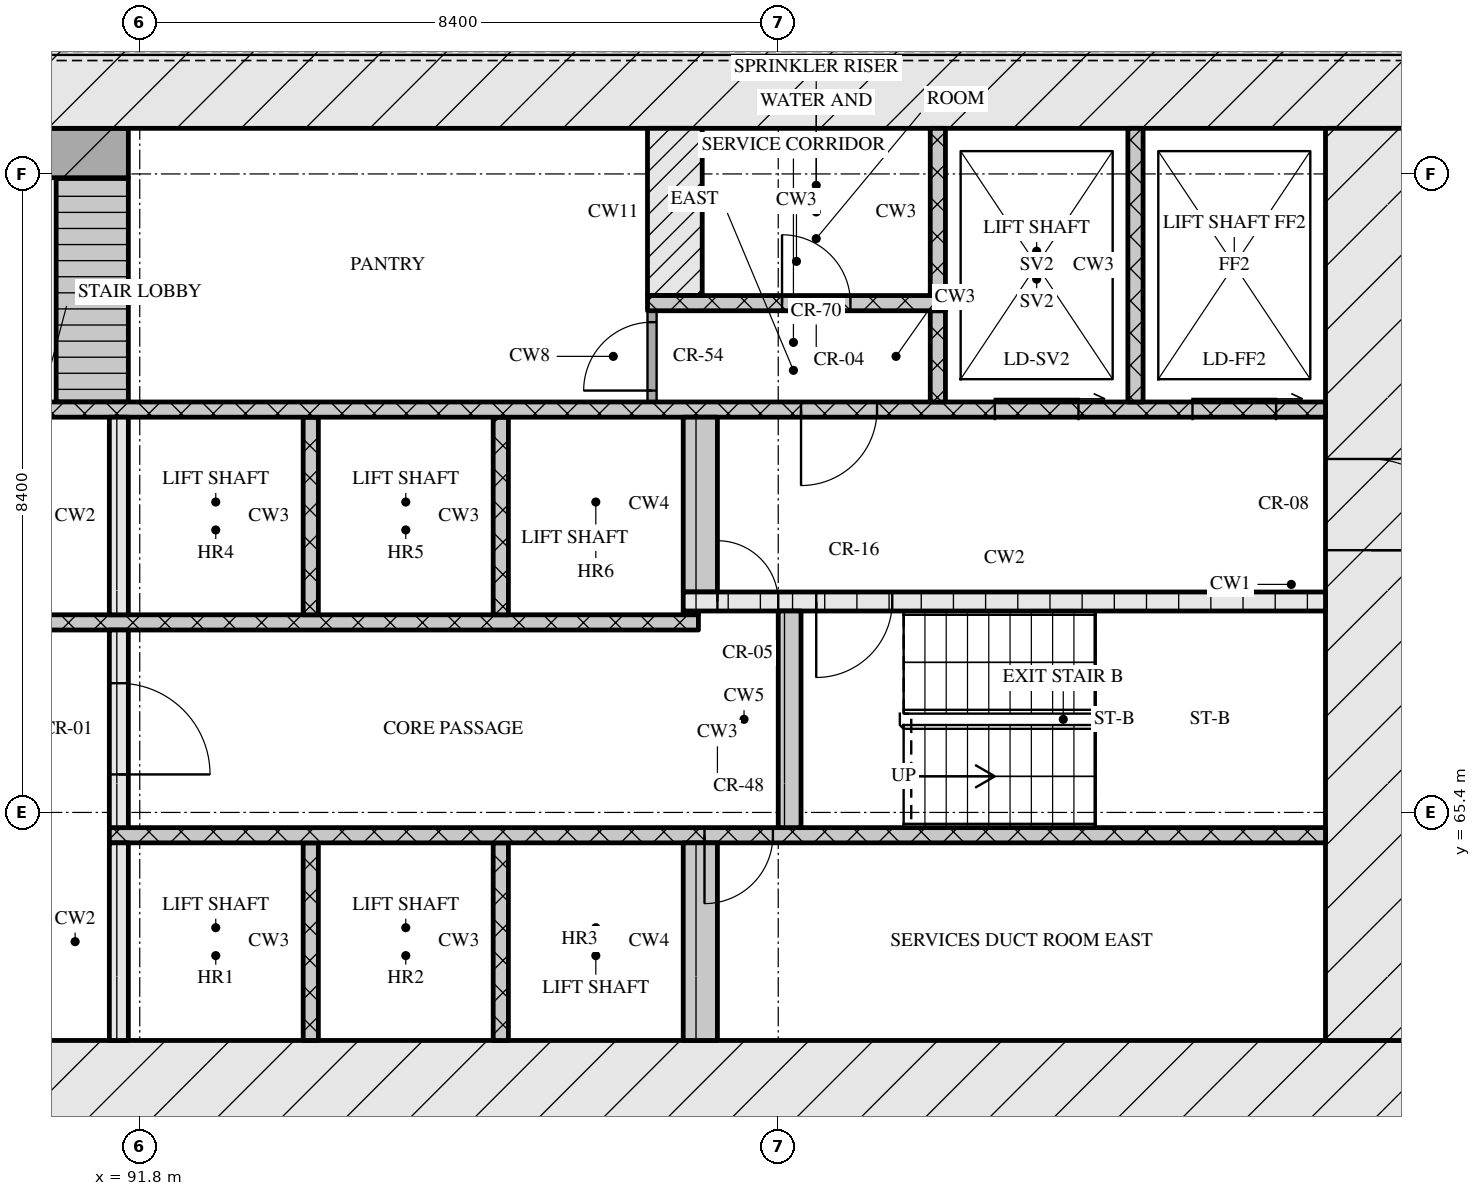
"""IFC4 building model, lengths in metres.
Left out: names, types, materials, properties, quantities, classifications, styles, units other than length and angle.
Written with IfcOpenShell. Run it as: python <this file> out.ifc"""

import sys

from ifc_helpers import new_model, si_unit, direction, frame, frame_2d, origin, place, context, subcontext, project, spatial, rectangle, extrude, element, fill, save


model = new_model("IFC4")
c1 = context("Model", 3, precision=1e-05, world=origin(), true_north=direction((0.0, 1.0)))
c2 = subcontext(c1, "Body", "Model", "MODEL_VIEW")
j1 = project(units=[si_unit("LENGTHUNIT", "METRE"), si_unit("PLANEANGLEUNIT", "RADIAN")], contexts=[c1])
p1 = place(None, origin())
s1 = spatial("IfcSite", under=j1, at=p1, CompositionType="ELEMENT")
p2 = place(p1, origin())
s2 = spatial("IfcBuilding", under=s1, at=p2, CompositionType="ELEMENT")
p3 = place(p2, frame((0.0, 0.0, 76.8)))
s3 = spatial("IfcBuildingStorey", under=s2, at=p3, CompositionType="ELEMENT", Elevation=76.8)
p4 = place(p3, frame((66.6, 61.8, 0.0), z_axis=(0.0, 0.0, 1.0), x_axis=(1.0, 0.0, 0.0)))
e1 = element("IfcWall", 1, at=p4, inside=s3, PredefinedType="SOLIDWALL", context=c2, shape_type="SweptSolid", body=[
    extrude(rectangle(XDim=42.0, YDim=1.2, at=frame_2d((21.0, 0.0))), origin(), (0.0, 0.0, 1.0), 3.32),
])
p5 = place(p4, frame((21.35, 0.0, 0.0)))
e2 = element("IfcOpeningElement", 2, at=p5, cuts=e1, PredefinedType="OPENING", context=c2, shape_type="SweptSolid", body=[
    extrude(rectangle(XDim=1.8, YDim=2.1, at=frame_2d((0.9, 1.05))), frame((0.0, 0.61, 0.0), z_axis=(0.0, -1.0, 0.0), x_axis=(1.0, 0.0, 0.0)), (0.0, 0.0, 1.0), 1.22),
])
p6 = place(p3, frame((66.6, 75.0, 0.0), z_axis=(0.0, 0.0, 1.0), x_axis=(1.0, 0.0, 0.0)))
e3 = element("IfcWall", 3, at=p6, inside=s3, PredefinedType="SOLIDWALL", context=c2, shape_type="SweptSolid", body=[
    extrude(rectangle(XDim=42.0, YDim=1.2, at=frame_2d((21.0, 0.0))), origin(), (0.0, 0.0, 1.0), 3.32),
])
p7 = place(p3, frame((108.0, 62.4, 0.0), z_axis=(0.0, 0.0, 1.0), x_axis=(0.0, 1.0, 0.0)))
e4 = element("IfcWall", 4, at=p7, inside=s3, PredefinedType="SOLIDWALL", context=c2, shape_type="SweptSolid", body=[
    extrude(rectangle(XDim=12.0, YDim=1.2, at=frame_2d((6.0, 0.0))), origin(), (0.0, 0.0, 1.0), 3.32),
])
p8 = place(p7, frame((6.45, 0.0, 0.0)))
e5 = element("IfcOpeningElement", 5, at=p8, cuts=e4, PredefinedType="OPENING", context=c2, shape_type="SweptSolid", body=[
    extrude(rectangle(XDim=1.2, YDim=2.1, at=frame_2d((0.6, 1.05))), frame((0.0, 0.61, 0.0), z_axis=(0.0, -1.0, 0.0), x_axis=(1.0, 0.0, 0.0)), (0.0, 0.0, 1.0), 1.22),
])
p9 = place(p3, frame((91.525, 62.4, 0.0), z_axis=(0.0, 0.0, 1.0), x_axis=(0.0, 1.0, 0.0)))
e6 = element("IfcWall", 6, at=p9, inside=s3, PredefinedType="SOLIDWALL", context=c2, shape_type="SweptSolid", body=[
    extrude(rectangle(XDim=2.6, YDim=0.25, at=frame_2d((1.3, 0.0))), origin(), (0.0, 0.0, 1.0), 3.32),
])
for number, where, z_axis, x_axis in (
    (7, (94.05, 62.4, 0.0), (0.0, 0.0, 1.0), (0.0, 1.0, 0.0)),
    (8, (96.55, 62.4, 0.0), (0.0, 0.0, 1.0), (0.0, 1.0, 0.0)),
):
    element("IfcWall", number, at=place(p3, frame(where, z_axis=z_axis, x_axis=x_axis)), inside=s3, PredefinedType="SOLIDWALL", context=c2, shape_type="SweptSolid", body=[
        extrude(rectangle(XDim=2.6, YDim=0.2, at=frame_2d((1.3, 0.0))), origin(), (0.0, 0.0, 1.0), 3.32),
    ])
p10 = place(p3, frame((99.175, 62.4, 0.0), z_axis=(0.0, 0.0, 1.0), x_axis=(0.0, 1.0, 0.0)))
e9 = element("IfcWall", 9, at=p10, inside=s3, PredefinedType="SOLIDWALL", context=c2, shape_type="SweptSolid", body=[
    extrude(rectangle(XDim=2.6, YDim=0.45, at=frame_2d((1.3, 0.0))), origin(), (0.0, 0.0, 1.0), 3.32),
])
p11 = place(p3, frame((91.4, 65.1, 0.0), z_axis=(0.0, 0.0, 1.0), x_axis=(1.0, 0.0, 0.0)))
e10 = element("IfcWall", 10, at=p11, inside=s3, PredefinedType="SOLIDWALL", context=c2, shape_type="SweptSolid", body=[
    extrude(rectangle(XDim=16.0, YDim=0.2, at=frame_2d((8.0, 0.0))), origin(), (0.0, 0.0, 1.0), 3.32),
])
p12 = place(p11, frame((7.83, 0.0, 0.0)))
e11 = element("IfcOpeningElement", 11, at=p12, cuts=e10, PredefinedType="OPENING", context=c2, shape_type="SweptSolid", body=[
    extrude(rectangle(XDim=0.9, YDim=2.1, at=frame_2d((0.45, 1.05))), frame((0.0, 0.11, 0.0), z_axis=(0.0, -1.0, 0.0), x_axis=(1.0, 0.0, 0.0)), (0.0, 0.0, 1.0), 0.22),
])
p13 = place(p3, frame((91.525, 65.2, 0.0), z_axis=(0.0, 0.0, 1.0), x_axis=(0.0, 1.0, 0.0)))
e12 = element("IfcWall", 12, at=p13, inside=s3, PredefinedType="SOLIDWALL", context=c2, shape_type="SweptSolid", body=[
    extrude(rectangle(XDim=2.6, YDim=0.25, at=frame_2d((1.3, 0.0))), origin(), (0.0, 0.0, 1.0), 3.32),
])
p14 = place(p13, frame((0.7, 0.0, 0.0)))
e13 = element("IfcOpeningElement", 13, at=p14, cuts=e12, PredefinedType="OPENING", context=c2, shape_type="SweptSolid", body=[
    extrude(rectangle(XDim=1.2, YDim=2.1, at=frame_2d((0.6, 1.05))), frame((0.0, 0.135, 0.0), z_axis=(0.0, -1.0, 0.0), x_axis=(1.0, 0.0, 0.0)), (0.0, 0.0, 1.0), 0.27),
])
p15 = place(p3, frame((100.35, 65.2, 0.0), z_axis=(0.0, 0.0, 1.0), x_axis=(0.0, 1.0, 0.0)))
e14 = element("IfcWall", 14, at=p15, inside=s3, PredefinedType="SOLIDWALL", context=c2, shape_type="SweptSolid", body=[
    extrude(rectangle(XDim=2.85, YDim=0.3, at=frame_2d((1.425, 0.0))), origin(), (0.0, 0.0, 1.0), 3.32),
])
p16 = place(p3, frame((76.05, 67.9, 0.0), z_axis=(0.0, 0.0, 1.0), x_axis=(1.0, 0.0, 0.0)))
e15 = element("IfcWall", 15, at=p16, inside=s3, PredefinedType="SOLIDWALL", context=c2, shape_type="SweptSolid", body=[
    extrude(rectangle(XDim=23.1, YDim=0.2, at=frame_2d((11.55, 0.0))), origin(), (0.0, 0.0, 1.0), 3.32),
])
p17 = place(p16, frame((0.6, 0.0, 0.0)))
e16 = element("IfcOpeningElement", 16, at=p17, cuts=e15, PredefinedType="OPENING", context=c2, shape_type="SweptSolid", body=[
    extrude(rectangle(XDim=1.1, YDim=2.1, at=frame_2d((0.55, 1.05))), frame((0.0, 0.11, 0.0), z_axis=(0.0, -1.0, 0.0), x_axis=(1.0, 0.0, 0.0)), (0.0, 0.0, 1.0), 0.22),
])
p18 = place(p16, frame((3.1, 0.0, 0.0)))
e17 = element("IfcOpeningElement", 17, at=p18, cuts=e15, PredefinedType="OPENING", context=c2, shape_type="SweptSolid", body=[
    extrude(rectangle(XDim=1.1, YDim=2.1, at=frame_2d((0.55, 1.05))), frame((0.0, 0.11, 0.0), z_axis=(0.0, -1.0, 0.0), x_axis=(1.0, 0.0, 0.0)), (0.0, 0.0, 1.0), 0.22),
])
p19 = place(p16, frame((5.6, 0.0, 0.0)))
e18 = element("IfcOpeningElement", 18, at=p19, cuts=e15, PredefinedType="OPENING", context=c2, shape_type="SweptSolid", body=[
    extrude(rectangle(XDim=1.1, YDim=2.1, at=frame_2d((0.55, 1.05))), frame((0.0, 0.11, 0.0), z_axis=(0.0, -1.0, 0.0), x_axis=(1.0, 0.0, 0.0)), (0.0, 0.0, 1.0), 0.22),
])
p20 = place(p16, frame((8.45, 0.0, 0.0)))
e19 = element("IfcOpeningElement", 19, at=p20, cuts=e15, PredefinedType="OPENING", context=c2, shape_type="SweptSolid", body=[
    extrude(rectangle(XDim=0.9, YDim=2.1, at=frame_2d((0.45, 1.05))), frame((0.0, 0.11, 0.0), z_axis=(0.0, -1.0, 0.0), x_axis=(1.0, 0.0, 0.0)), (0.0, 0.0, 1.0), 0.22),
])
p21 = place(p16, frame((10.91, 0.0, 0.0)))
e20 = element("IfcOpeningElement", 20, at=p21, cuts=e15, PredefinedType="OPENING", context=c2, shape_type="SweptSolid", body=[
    extrude(rectangle(XDim=0.9, YDim=2.1, at=frame_2d((0.45, 1.05))), frame((0.0, 0.11, 0.0), z_axis=(0.0, -1.0, 0.0), x_axis=(1.0, 0.0, 0.0)), (0.0, 0.0, 1.0), 0.22),
])
p22 = place(p16, frame((13.55, 0.0, 0.0)))
e21 = element("IfcOpeningElement", 21, at=p22, cuts=e15, PredefinedType="OPENING", context=c2, shape_type="SweptSolid", body=[
    extrude(rectangle(XDim=1.0, YDim=2.1, at=frame_2d((0.5, 1.05))), frame((0.0, 0.11, 0.0), z_axis=(0.0, -1.0, 0.0), x_axis=(1.0, 0.0, 0.0)), (0.0, 0.0, 1.0), 0.22),
])
p23 = place(p3, frame((91.525, 68.0, 0.0), z_axis=(0.0, 0.0, 1.0), x_axis=(0.0, 1.0, 0.0)))
e22 = element("IfcWall", 22, at=p23, inside=s3, PredefinedType="SOLIDWALL", context=c2, shape_type="SweptSolid", body=[
    extrude(rectangle(XDim=2.6, YDim=0.25, at=frame_2d((1.3, 0.0))), origin(), (0.0, 0.0, 1.0), 3.32),
])
for number, where, z_axis, x_axis in (
    (23, (94.05, 68.0, 0.0), (0.0, 0.0, 1.0), (0.0, 1.0, 0.0)),
    (24, (96.55, 68.0, 0.0), (0.0, 0.0, 1.0), (0.0, 1.0, 0.0)),
):
    element("IfcWall", number, at=place(p3, frame(where, z_axis=z_axis, x_axis=x_axis)), inside=s3, PredefinedType="SOLIDWALL", context=c2, shape_type="SweptSolid", body=[
        extrude(rectangle(XDim=2.6, YDim=0.2, at=frame_2d((1.3, 0.0))), origin(), (0.0, 0.0, 1.0), 3.32),
    ])
p24 = place(p3, frame((98.95, 68.025, 0.0), z_axis=(0.0, 0.0, 1.0), x_axis=(1.0, 0.0, 0.0)))
e25 = element("IfcWall", 25, at=p24, inside=s3, PredefinedType="SOLIDWALL", context=c2, shape_type="SweptSolid", body=[
    extrude(rectangle(XDim=0.2, YDim=0.05, at=frame_2d((0.1, 0.0))), origin(), (0.0, 0.0, 1.0), 3.32),
])
p25 = place(p3, frame((98.95, 68.175, 0.0), z_axis=(0.0, 0.0, 1.0), x_axis=(1.0, 0.0, 0.0)))
e26 = element("IfcWall", 26, at=p25, inside=s3, PredefinedType="SOLIDWALL", context=c2, shape_type="SweptSolid", body=[
    extrude(rectangle(XDim=8.45, YDim=0.25, at=frame_2d((4.225, 0.0))), origin(), (0.0, 0.0, 1.0), 3.32),
])
p26 = place(p25, frame((0.45, 0.0, 0.0)))
e27 = element("IfcOpeningElement", 27, at=p26, cuts=e26, PredefinedType="OPENING", context=c2, shape_type="SweptSolid", body=[
    extrude(rectangle(XDim=0.8, YDim=2.1, at=frame_2d((0.4, 1.05))), frame((0.0, 0.135, 0.0), z_axis=(0.0, -1.0, 0.0), x_axis=(1.0, 0.0, 0.0)), (0.0, 0.0, 1.0), 0.27),
])
p27 = place(p25, frame((1.75, 0.0, 0.0)))
e28 = element("IfcOpeningElement", 28, at=p27, cuts=e26, PredefinedType="OPENING", context=c2, shape_type="SweptSolid", body=[
    extrude(rectangle(XDim=1.0, YDim=2.1, at=frame_2d((0.5, 1.05))), frame((0.0, 0.135, 0.0), z_axis=(0.0, -1.0, 0.0), x_axis=(1.0, 0.0, 0.0)), (0.0, 0.0, 1.0), 0.27),
])
p28 = place(p3, frame((99.175, 68.3, 0.0), z_axis=(0.0, 0.0, 1.0), x_axis=(0.0, 1.0, 0.0)))
e29 = element("IfcWall", 29, at=p28, inside=s3, PredefinedType="SOLIDWALL", context=c2, shape_type="SweptSolid", body=[
    extrude(rectangle(XDim=2.3, YDim=0.45, at=frame_2d((1.15, 0.0))), origin(), (0.0, 0.0, 1.0), 3.32),
])
p29 = place(p3, frame((67.8, 70.7, 0.0), z_axis=(0.0, 0.0, 1.0), x_axis=(1.0, 0.0, 0.0)))
e30 = element("IfcWall", 30, at=p29, inside=s3, PredefinedType="SOLIDWALL", context=c2, shape_type="SweptSolid", body=[
    extrude(rectangle(XDim=39.6, YDim=0.2, at=frame_2d((19.8, 0.0))), origin(), (0.0, 0.0, 1.0), 3.32),
])
p30 = place(p29, frame((0.65, 0.0, 0.0)))
e31 = element("IfcOpeningElement", 31, at=p30, cuts=e30, PredefinedType="OPENING", context=c2, shape_type="SweptSolid", body=[
    extrude(rectangle(XDim=1.1, YDim=2.1, at=frame_2d((0.55, 1.05))), frame((0.0, 0.11, 0.0), z_axis=(0.0, -1.0, 0.0), x_axis=(1.0, 0.0, 0.0)), (0.0, 0.0, 1.0), 0.22),
])
p31 = place(p29, frame((3.25, 0.0, 0.0)))
e32 = element("IfcOpeningElement", 32, at=p31, cuts=e30, PredefinedType="OPENING", context=c2, shape_type="SweptSolid", body=[
    extrude(rectangle(XDim=1.1, YDim=2.1, at=frame_2d((0.55, 1.05))), frame((0.0, 0.11, 0.0), z_axis=(0.0, -1.0, 0.0), x_axis=(1.0, 0.0, 0.0)), (0.0, 0.0, 1.0), 0.22),
])
p32 = place(p29, frame((5.9, 0.0, 0.0)))
e33 = element("IfcOpeningElement", 33, at=p32, cuts=e30, PredefinedType="OPENING", context=c2, shape_type="SweptSolid", body=[
    extrude(rectangle(XDim=1.0, YDim=2.1, at=frame_2d((0.5, 1.05))), frame((0.0, 0.11, 0.0), z_axis=(0.0, -1.0, 0.0), x_axis=(1.0, 0.0, 0.0)), (0.0, 0.0, 1.0), 0.22),
])
p33 = place(p29, frame((21.7, 0.0, 0.0)))
e34 = element("IfcOpeningElement", 34, at=p33, cuts=e30, PredefinedType="OPENING", context=c2, shape_type="SweptSolid", body=[
    extrude(rectangle(XDim=1.0, YDim=2.1, at=frame_2d((0.5, 1.05))), frame((0.0, 0.11, 0.0), z_axis=(0.0, -1.0, 0.0), x_axis=(1.0, 0.0, 0.0)), (0.0, 0.0, 1.0), 0.22),
])
p34 = place(p29, frame((32.7, 0.0, 0.0)))
e35 = element("IfcOpeningElement", 35, at=p34, cuts=e30, PredefinedType="OPENING", context=c2, shape_type="SweptSolid", body=[
    extrude(rectangle(XDim=1.0, YDim=2.1, at=frame_2d((0.5, 1.05))), frame((0.0, 0.11, 0.0), z_axis=(0.0, -1.0, 0.0), x_axis=(1.0, 0.0, 0.0)), (0.0, 0.0, 1.0), 0.22),
])
p35 = place(p29, frame((35.25, 0.0, 0.0)))
e36 = element("IfcOpeningElement", 36, at=p35, cuts=e30, PredefinedType="OPENING", context=c2, shape_type="SweptSolid", body=[
    extrude(rectangle(XDim=1.1, YDim=2.1, at=frame_2d((0.55, 1.05))), frame((0.0, 0.11, 0.0), z_axis=(0.0, -1.0, 0.0), x_axis=(1.0, 0.0, 0.0)), (0.0, 0.0, 1.0), 0.22),
])
p36 = place(p29, frame((37.85, 0.0, 0.0)))
e37 = element("IfcOpeningElement", 37, at=p36, cuts=e30, PredefinedType="OPENING", context=c2, shape_type="SweptSolid", body=[
    extrude(rectangle(XDim=1.1, YDim=2.1, at=frame_2d((0.55, 1.05))), frame((0.0, 0.11, 0.0), z_axis=(0.0, -1.0, 0.0), x_axis=(1.0, 0.0, 0.0)), (0.0, 0.0, 1.0), 0.22),
])
p37 = place(p3, frame((91.175, 70.8, 0.0), z_axis=(0.0, 0.0, 1.0), x_axis=(0.0, 1.0, 0.0)))
e38 = element("IfcWall", 38, at=p37, inside=s3, PredefinedType="SOLIDWALL", context=c2, shape_type="SweptSolid", body=[
    extrude(rectangle(XDim=2.95, YDim=0.95, at=frame_2d((1.475, 0.0))), origin(), (0.0, 0.0, 1.0), 3.32),
])
p38 = place(p3, frame((98.54, 70.8, 0.0), z_axis=(0.0, 0.0, 1.0), x_axis=(0.0, 1.0, 0.0)))
e39 = element("IfcWall", 39, at=p38, inside=s3, PredefinedType="PARTITIONING", context=c2, shape_type="SweptSolid", body=[
    extrude(rectangle(XDim=1.2, YDim=0.12, at=frame_2d((0.6, 0.0))), origin(), (0.0, 0.0, 1.0), 3.32),
])
p39 = place(p38, frame((0.15, 0.0, 0.0)))
e40 = element("IfcOpeningElement", 40, at=p39, cuts=e39, PredefinedType="OPENING", context=c2, shape_type="SweptSolid", body=[
    extrude(rectangle(XDim=0.9, YDim=2.1, at=frame_2d((0.45, 1.05))), frame((0.0, 0.07, 0.0), z_axis=(0.0, -1.0, 0.0), x_axis=(1.0, 0.0, 0.0)), (0.0, 0.0, 1.0), 0.14),
])
p40 = place(p3, frame((102.3, 70.8, 0.0), z_axis=(0.0, 0.0, 1.0), x_axis=(0.0, 1.0, 0.0)))
e41 = element("IfcWall", 41, at=p40, inside=s3, PredefinedType="SOLIDWALL", context=c2, shape_type="SweptSolid", body=[
    extrude(rectangle(XDim=1.2, YDim=0.2, at=frame_2d((0.6, 0.0))), origin(), (0.0, 0.0, 1.0), 3.32),
])
p41 = place(p3, frame((104.9, 70.8, 0.0), z_axis=(0.0, 0.0, 1.0), x_axis=(0.0, 1.0, 0.0)))
e42 = element("IfcWall", 42, at=p41, inside=s3, PredefinedType="SOLIDWALL", context=c2, shape_type="SweptSolid", body=[
    extrude(rectangle(XDim=3.6, YDim=0.2, at=frame_2d((1.8, 0.0))), origin(), (0.0, 0.0, 1.0), 3.32),
])
p42 = place(p3, frame((98.48, 72.1, 0.0), z_axis=(0.0, 0.0, 1.0), x_axis=(1.0, 0.0, 0.0)))
e43 = element("IfcWall", 43, at=p42, inside=s3, PredefinedType="SOLIDWALL", context=c2, shape_type="SweptSolid", body=[
    extrude(rectangle(XDim=3.92, YDim=0.2, at=frame_2d((1.96, 0.0))), origin(), (0.0, 0.0, 1.0), 3.32),
])
p43 = place(p42, frame((1.77, 0.0, 0.0)))
e44 = element("IfcOpeningElement", 44, at=p43, cuts=e43, PredefinedType="OPENING", context=c2, shape_type="SweptSolid", body=[
    extrude(rectangle(XDim=0.9, YDim=2.1, at=frame_2d((0.45, 1.05))), frame((0.0, 0.11, 0.0), z_axis=(0.0, -1.0, 0.0), x_axis=(1.0, 0.0, 0.0)), (0.0, 0.0, 1.0), 0.22),
])
p44 = place(p3, frame((98.84, 72.2, 0.0), z_axis=(0.0, 0.0, 1.0), x_axis=(0.0, 1.0, 0.0)))
e45 = element("IfcWall", 45, at=p44, inside=s3, PredefinedType="SOLIDWALL", context=c2, shape_type="SweptSolid", body=[
    extrude(rectangle(XDim=2.2, YDim=0.72, at=frame_2d((1.1, 0.0))), origin(), (0.0, 0.0, 1.0), 3.32),
])
p45 = place(p3, frame((102.3, 72.2, 0.0), z_axis=(0.0, 0.0, 1.0), x_axis=(0.0, 1.0, 0.0)))
e46 = element("IfcWall", 46, at=p45, inside=s3, PredefinedType="SOLIDWALL", context=c2, shape_type="SweptSolid", body=[
    extrude(rectangle(XDim=2.2, YDim=0.2, at=frame_2d((1.1, 0.0))), origin(), (0.0, 0.0, 1.0), 3.32),
])
p46 = place(p3, frame((83.55, 74.075, 0.0), z_axis=(0.0, 0.0, 1.0), x_axis=(1.0, 0.0, 0.0)))
e47 = element("IfcWall", 47, at=p46, inside=s3, PredefinedType="SOLIDWALL", context=c2, shape_type="SweptSolid", body=[
    extrude(rectangle(XDim=8.1, YDim=0.65, at=frame_2d((4.05, 0.0))), origin(), (0.0, 0.0, 1.0), 3.32),
])
p47 = place(p12, origin())
e48 = element("IfcDoor", 48, at=p47, inside=s3, OperationType="SINGLE_SWING_RIGHT", PredefinedType="DOOR", context=c2, shape_type="SweptSolid", body=[
    extrude(rectangle(XDim=0.9, YDim=2.1, at=frame_2d((0.45, 1.05))), frame((0.0, 0.025, 0.0), z_axis=(0.0, -1.0, 0.0), x_axis=(1.0, 0.0, 0.0)), (0.0, 0.0, 1.0), 0.05),
])
fill(e11, e48)
p48 = place(p14, origin())
e49 = element("IfcDoor", 49, at=p48, inside=s3, OperationType="SINGLE_SWING_RIGHT", PredefinedType="DOOR", context=c2, shape_type="SweptSolid", body=[
    extrude(rectangle(XDim=1.2, YDim=2.1, at=frame_2d((0.6, 1.05))), frame((0.0, 0.025, 0.0), z_axis=(0.0, -1.0, 0.0), x_axis=(1.0, 0.0, 0.0)), (0.0, 0.0, 1.0), 0.05),
])
fill(e13, e49)
p49 = place(p26, origin())
e50 = element("IfcDoor", 50, at=p49, inside=s3, OperationType="SINGLE_SWING_LEFT", PredefinedType="DOOR", context=c2, shape_type="SweptSolid", body=[
    extrude(rectangle(XDim=0.8, YDim=2.1, at=frame_2d((0.4, 1.05))), frame((0.0, 0.025, 0.0), z_axis=(0.0, -1.0, 0.0), x_axis=(1.0, 0.0, 0.0)), (0.0, 0.0, 1.0), 0.05),
])
fill(e27, e50)
p50 = place(p27, origin())
e51 = element("IfcDoor", 51, at=p50, inside=s3, OperationType="SINGLE_SWING_RIGHT", PredefinedType="DOOR", context=c2, shape_type="SweptSolid", body=[
    extrude(rectangle(XDim=1.0, YDim=2.1, at=frame_2d((0.5, 1.05))), frame((0.0, 0.025, 0.0), z_axis=(0.0, -1.0, 0.0), x_axis=(1.0, 0.0, 0.0)), (0.0, 0.0, 1.0), 0.05),
])
fill(e28, e51)
p51 = place(p8, origin())
e52 = element("IfcDoor", 52, at=p51, inside=s3, OperationType="SINGLE_SWING_RIGHT", PredefinedType="DOOR", context=c2, shape_type="SweptSolid", body=[
    extrude(rectangle(XDim=1.2, YDim=2.1, at=frame_2d((0.6, 1.05))), frame((0.0, 0.025, 0.0), z_axis=(0.0, -1.0, 0.0), x_axis=(1.0, 0.0, 0.0)), (0.0, 0.0, 1.0), 0.05),
])
fill(e5, e52)
p52 = place(p34, origin())
e53 = element("IfcDoor", 53, at=p52, inside=s3, OperationType="SINGLE_SWING_RIGHT", PredefinedType="DOOR", context=c2, shape_type="SweptSolid", body=[
    extrude(rectangle(XDim=1.0, YDim=2.1, at=frame_2d((0.5, 1.05))), frame((0.0, 0.025, 0.0), z_axis=(0.0, -1.0, 0.0), x_axis=(1.0, 0.0, 0.0)), (0.0, 0.0, 1.0), 0.05),
])
fill(e35, e53)
p53 = place(p35, origin())
e54 = element("IfcDoor", 54, at=p53, inside=s3, OperationType="SLIDING_TO_RIGHT", PredefinedType="DOOR", context=c2, shape_type="SweptSolid", body=[
    extrude(rectangle(XDim=1.1, YDim=2.1, at=frame_2d((0.55, 1.05))), frame((0.0, 0.025, 0.0), z_axis=(0.0, -1.0, 0.0), x_axis=(1.0, 0.0, 0.0)), (0.0, 0.0, 1.0), 0.05),
])
fill(e36, e54)
p54 = place(p36, origin())
e55 = element("IfcDoor", 55, at=p54, inside=s3, OperationType="SLIDING_TO_RIGHT", PredefinedType="DOOR", context=c2, shape_type="SweptSolid", body=[
    extrude(rectangle(XDim=1.1, YDim=2.1, at=frame_2d((0.55, 1.05))), frame((0.0, 0.025, 0.0), z_axis=(0.0, -1.0, 0.0), x_axis=(1.0, 0.0, 0.0)), (0.0, 0.0, 1.0), 0.05),
])
fill(e37, e55)
p55 = place(p39, origin())
e56 = element("IfcDoor", 56, at=p55, inside=s3, OperationType="SINGLE_SWING_LEFT", PredefinedType="DOOR", context=c2, shape_type="SweptSolid", body=[
    extrude(rectangle(XDim=0.9, YDim=2.1, at=frame_2d((0.45, 1.05))), frame((0.0, 0.025, 0.0), z_axis=(0.0, -1.0, 0.0), x_axis=(1.0, 0.0, 0.0)), (0.0, 0.0, 1.0), 0.05),
])
fill(e40, e56)
p56 = place(p43, origin())
e57 = element("IfcDoor", 57, at=p56, inside=s3, OperationType="SINGLE_SWING_LEFT", PredefinedType="DOOR", context=c2, shape_type="SweptSolid", body=[
    extrude(rectangle(XDim=0.9, YDim=2.1, at=frame_2d((0.45, 1.05))), frame((0.0, 0.025, 0.0), z_axis=(0.0, -1.0, 0.0), x_axis=(1.0, 0.0, 0.0)), (0.0, 0.0, 1.0), 0.05),
])
fill(e44, e57)
save(model, sys.argv[1])
